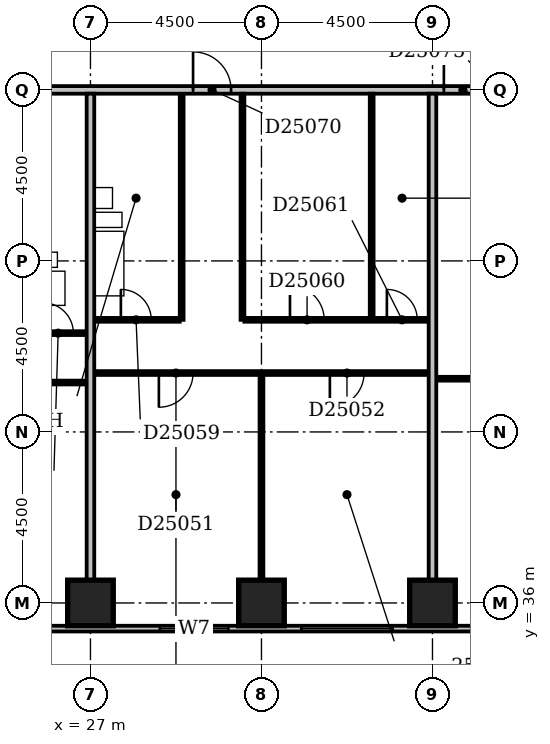
"""IFC4 building model, lengths in metres.
Left out: names, types, materials, properties, quantities, classifications, styles, units other than length and angle.
Written with IfcOpenShell. Run it as: python <this file> out.ifc"""

import sys

from ifc_helpers import new_model, si_unit, direction, frame, frame_2d, origin, origin_2d, place, context, subcontext, project, spatial, rectangle, extrude, element, fill, save


model = new_model("IFC4")
c1 = context("Model", 3, precision=1e-05, world=origin(), true_north=direction((0.0, 1.0)))
c2 = subcontext(c1, "Body", "Model", "MODEL_VIEW")
j1 = project(units=[si_unit("LENGTHUNIT", "METRE"), si_unit("PLANEANGLEUNIT", "RADIAN")], contexts=[c1])
p1 = place(None, origin())
s1 = spatial("IfcSite", under=j1, at=p1, CompositionType="ELEMENT")
p2 = place(p1, origin())
s2 = spatial("IfcBuilding", under=s1, at=p2, CompositionType="ELEMENT")
p3 = place(p2, frame((0.0, 0.0, 101.0)))
s3 = spatial("IfcBuildingStorey", under=s2, at=p3, CompositionType="ELEMENT", Elevation=101.0)
for number, where, z_axis, x_axis in (
    (1, (27.0, 36.0, -0.3), (0.0, 0.0, 1.0), (1.0, 0.0, 0.0)),
    (2, (31.5, 36.0, -0.3), (0.0, 0.0, 1.0), (1.0, 0.0, 0.0)),
    (3, (36.0, 36.0, -0.3), (0.0, 0.0, 1.0), (1.0, 0.0, 0.0)),
):
    element("IfcColumn", number, at=place(p3, frame(where, z_axis=z_axis, x_axis=x_axis)), inside=s3, PredefinedType="COLUMN", context=c2, shape_type="SweptSolid", body=[
        extrude(rectangle(XDim=1.2, YDim=1.2, at=origin_2d()), origin(), (0.0, 0.0, 1.0), 3.6),
    ])
p4 = place(p3, frame((23.1, 35.325, 0.0), z_axis=(0.0, 0.0, 1.0), x_axis=(1.0, 0.0, 0.0)))
e4 = element("IfcWall", 4, at=p4, inside=s3, PredefinedType="STANDARD", context=c2, shape_type="SweptSolid", body=[
    extrude(rectangle(XDim=45.15, YDim=0.15, at=frame_2d((22.575, 0.0))), origin(), (0.0, 0.0, 1.0), 2.7),
])
p5 = place(p4, frame((0.45, 0.0, 0.6)))
e5 = element("IfcOpeningElement", 5, at=p5, cuts=e4, PredefinedType="OPENING", context=c2, shape_type="SweptSolid", body=[
    extrude(rectangle(XDim=2.4, YDim=1.8, at=frame_2d((1.2, 0.9))), frame((0.0, 0.087, 0.0), z_axis=(0.0, -1.0, 0.0), x_axis=(1.0, 0.0, 0.0)), (0.0, 0.0, 1.0), 0.174),
])
p6 = place(p4, frame((5.728, 0.0, 0.6)))
e6 = element("IfcOpeningElement", 6, at=p6, cuts=e4, PredefinedType="OPENING", context=c2, shape_type="SweptSolid", body=[
    extrude(rectangle(XDim=1.8, YDim=1.8, at=frame_2d((0.9, 0.9))), frame((0.0, 0.087, 0.0), z_axis=(0.0, -1.0, 0.0), x_axis=(1.0, 0.0, 0.0)), (0.0, 0.0, 1.0), 0.174),
])
p7 = place(p4, frame((9.45, 0.0, 0.6)))
e7 = element("IfcOpeningElement", 7, at=p7, cuts=e4, PredefinedType="OPENING", context=c2, shape_type="SweptSolid", body=[
    extrude(rectangle(XDim=2.4, YDim=1.8, at=frame_2d((1.2, 0.9))), frame((0.0, 0.087, 0.0), z_axis=(0.0, -1.0, 0.0), x_axis=(1.0, 0.0, 0.0)), (0.0, 0.0, 1.0), 0.174),
])
p8 = place(p4, frame((13.95, 0.0, 0.6)))
e8 = element("IfcOpeningElement", 8, at=p8, cuts=e4, PredefinedType="OPENING", context=c2, shape_type="SweptSolid", body=[
    extrude(rectangle(XDim=2.4, YDim=1.8, at=frame_2d((1.2, 0.9))), frame((0.0, 0.087, 0.0), z_axis=(0.0, -1.0, 0.0), x_axis=(1.0, 0.0, 0.0)), (0.0, 0.0, 1.0), 0.174),
])
p9 = place(p4, frame((18.276, 0.0, 0.6)))
e9 = element("IfcOpeningElement", 9, at=p9, cuts=e4, PredefinedType="OPENING", context=c2, shape_type="SweptSolid", body=[
    extrude(rectangle(XDim=2.4, YDim=1.8, at=frame_2d((1.2, 0.9))), frame((0.0, 0.087, 0.0), z_axis=(0.0, -1.0, 0.0), x_axis=(1.0, 0.0, 0.0)), (0.0, 0.0, 1.0), 0.174),
])
p10 = place(p4, frame((22.95, 0.0, 0.6)))
e10 = element("IfcOpeningElement", 10, at=p10, cuts=e4, PredefinedType="OPENING", context=c2, shape_type="SweptSolid", body=[
    extrude(rectangle(XDim=2.4, YDim=1.8, at=frame_2d((1.2, 0.9))), frame((0.0, 0.087, 0.0), z_axis=(0.0, -1.0, 0.0), x_axis=(1.0, 0.0, 0.0)), (0.0, 0.0, 1.0), 0.174),
])
p11 = place(p4, frame((27.45, 0.0, 0.6)))
e11 = element("IfcOpeningElement", 11, at=p11, cuts=e4, PredefinedType="OPENING", context=c2, shape_type="SweptSolid", body=[
    extrude(rectangle(XDim=2.4, YDim=1.8, at=frame_2d((1.2, 0.9))), frame((0.0, 0.087, 0.0), z_axis=(0.0, -1.0, 0.0), x_axis=(1.0, 0.0, 0.0)), (0.0, 0.0, 1.0), 0.174),
])
p12 = place(p4, frame((33.921, 0.0, 0.6)))
e12 = element("IfcOpeningElement", 12, at=p12, cuts=e4, PredefinedType="OPENING", context=c2, shape_type="SweptSolid", body=[
    extrude(rectangle(XDim=0.6, YDim=1.8, at=frame_2d((0.3, 0.9))), frame((0.0, 0.087, 0.0), z_axis=(0.0, -1.0, 0.0), x_axis=(1.0, 0.0, 0.0)), (0.0, 0.0, 1.0), 0.174),
])
p13 = place(p4, frame((36.45, 0.0, 0.6)))
e13 = element("IfcOpeningElement", 13, at=p13, cuts=e4, PredefinedType="OPENING", context=c2, shape_type="SweptSolid", body=[
    extrude(rectangle(XDim=2.4, YDim=1.8, at=frame_2d((1.2, 0.9))), frame((0.0, 0.087, 0.0), z_axis=(0.0, -1.0, 0.0), x_axis=(1.0, 0.0, 0.0)), (0.0, 0.0, 1.0), 0.174),
])
p14 = place(p4, frame((40.95, 0.0, 0.6)))
e14 = element("IfcOpeningElement", 14, at=p14, cuts=e4, PredefinedType="OPENING", context=c2, shape_type="SweptSolid", body=[
    extrude(rectangle(XDim=2.4, YDim=1.8, at=frame_2d((1.2, 0.9))), frame((0.0, 0.087, 0.0), z_axis=(0.0, -1.0, 0.0), x_axis=(1.0, 0.0, 0.0)), (0.0, 0.0, 1.0), 0.174),
])
p15 = place(p3, frame((27.0, 36.6, 0.0), z_axis=(0.0, 0.0, 1.0), x_axis=(0.0, 1.0, 0.0)))
e15 = element("IfcWall", 15, at=p15, inside=s3, PredefinedType="PARTITIONING", context=c2, shape_type="SweptSolid", body=[
    extrude(rectangle(XDim=12.8, YDim=0.2, at=frame_2d((6.4, 0.0))), origin(), (0.0, 0.0, 1.0), 2.6),
])
p16 = place(p3, frame((31.5, 36.6, 0.0), z_axis=(0.0, 0.0, 1.0), x_axis=(0.0, 1.0, 0.0)))
e16 = element("IfcWall", 16, at=p16, inside=s3, PredefinedType="PARTITIONING", context=c2, shape_type="SweptSolid", body=[
    extrude(rectangle(XDim=5.4, YDim=0.1, at=frame_2d((2.7, 0.0))), origin(), (0.0, 0.0, 1.0), 3.3),
])
p17 = place(p3, frame((36.0, 36.6, 0.0), z_axis=(0.0, 0.0, 1.0), x_axis=(0.0, 1.0, 0.0)))
e17 = element("IfcWall", 17, at=p17, inside=s3, PredefinedType="PARTITIONING", context=c2, shape_type="SweptSolid", body=[
    extrude(rectangle(XDim=12.8, YDim=0.2, at=frame_2d((6.4, 0.0))), origin(), (0.0, 0.0, 1.0), 2.4),
])
p18 = place(p3, frame((22.6, 41.8, 0.0), z_axis=(0.0, 0.0, 1.0), x_axis=(1.0, 0.0, 0.0)))
e18 = element("IfcWall", 18, at=p18, inside=s3, PredefinedType="PARTITIONING", context=c2, shape_type="SweptSolid", body=[
    extrude(rectangle(XDim=4.3, YDim=0.1, at=frame_2d((2.15, 0.0))), origin(), (0.0, 0.0, 1.0), 3.3),
])
p19 = place(p18, frame((1.7, 0.0, 0.0)))
e19 = element("IfcOpeningElement", 19, at=p19, cuts=e18, PredefinedType="OPENING", context=c2, shape_type="SweptSolid", body=[
    extrude(rectangle(XDim=0.9, YDim=2.1, at=frame_2d((0.45, 1.05))), frame((0.0, 0.062, 0.0), z_axis=(0.0, -1.0, 0.0), x_axis=(1.0, 0.0, 0.0)), (0.0, 0.0, 1.0), 0.124),
])
p20 = place(p3, frame((36.1, 41.9, 0.0), z_axis=(0.0, 0.0, 1.0), x_axis=(1.0, 0.0, 0.0)))
e20 = element("IfcWall", 20, at=p20, inside=s3, PredefinedType="PARTITIONING", context=c2, shape_type="SweptSolid", body=[
    extrude(rectangle(XDim=13.3, YDim=0.1, at=frame_2d((6.65, 0.0))), origin(), (0.0, 0.0, 1.0), 3.3),
])
p21 = place(p20, frame((1.7, 0.0, 0.0)))
e21 = element("IfcOpeningElement", 21, at=p21, cuts=e20, PredefinedType="OPENING", context=c2, shape_type="SweptSolid", body=[
    extrude(rectangle(XDim=0.9, YDim=2.1, at=frame_2d((0.45, 1.05))), frame((0.0, 0.062, 0.0), z_axis=(0.0, -1.0, 0.0), x_axis=(1.0, 0.0, 0.0)), (0.0, 0.0, 1.0), 0.124),
])
p22 = place(p20, frame((7.35, 0.0, 0.0)))
e22 = element("IfcOpeningElement", 22, at=p22, cuts=e20, PredefinedType="OPENING", context=c2, shape_type="SweptSolid", body=[
    extrude(rectangle(XDim=0.9, YDim=2.1, at=frame_2d((0.45, 1.05))), frame((0.0, 0.062, 0.0), z_axis=(0.0, -1.0, 0.0), x_axis=(1.0, 0.0, 0.0)), (0.0, 0.0, 1.0), 0.124),
])
p23 = place(p20, frame((10.7, 0.0, 0.0)))
e23 = element("IfcOpeningElement", 23, at=p23, cuts=e20, PredefinedType="OPENING", context=c2, shape_type="SweptSolid", body=[
    extrude(rectangle(XDim=0.9, YDim=2.1, at=frame_2d((0.45, 1.05))), frame((0.0, 0.062, 0.0), z_axis=(0.0, -1.0, 0.0), x_axis=(1.0, 0.0, 0.0)), (0.0, 0.0, 1.0), 0.124),
])
p24 = place(p3, frame((27.1, 42.05, 0.0), z_axis=(0.0, 0.0, 1.0), x_axis=(1.0, 0.0, 0.0)))
e24 = element("IfcWall", 24, at=p24, inside=s3, PredefinedType="PARTITIONING", context=c2, shape_type="SweptSolid", body=[
    extrude(rectangle(XDim=8.8, YDim=0.1, at=frame_2d((4.4, 0.0))), origin(), (0.0, 0.0, 1.0), 3.3),
])
p25 = place(p24, frame((1.7, 0.0, 0.0)))
e25 = element("IfcOpeningElement", 25, at=p25, cuts=e24, PredefinedType="OPENING", context=c2, shape_type="SweptSolid", body=[
    extrude(rectangle(XDim=0.9, YDim=2.1, at=frame_2d((0.45, 1.05))), frame((0.0, 0.062, 0.0), z_axis=(0.0, -1.0, 0.0), x_axis=(1.0, 0.0, 0.0)), (0.0, 0.0, 1.0), 0.124),
])
p26 = place(p24, frame((6.2, 0.0, 0.0)))
e26 = element("IfcOpeningElement", 26, at=p26, cuts=e24, PredefinedType="OPENING", context=c2, shape_type="SweptSolid", body=[
    extrude(rectangle(XDim=0.9, YDim=2.1, at=frame_2d((0.45, 1.05))), frame((0.0, 0.062, 0.0), z_axis=(0.0, -1.0, 0.0), x_axis=(1.0, 0.0, 0.0)), (0.0, 0.0, 1.0), 0.124),
])
p27 = place(p3, frame((25.35, 43.1, 0.0), z_axis=(0.0, 0.0, 1.0), x_axis=(1.0, 0.0, 0.0)))
e27 = element("IfcWall", 27, at=p27, inside=s3, PredefinedType="PARTITIONING", context=c2, shape_type="SweptSolid", body=[
    extrude(rectangle(XDim=1.55, YDim=0.1, at=frame_2d((0.775, 0.0))), origin(), (0.0, 0.0, 1.0), 3.3),
])
p28 = place(p27, frame((0.4, 0.0, 0.0)))
e28 = element("IfcOpeningElement", 28, at=p28, cuts=e27, PredefinedType="OPENING", context=c2, shape_type="SweptSolid", body=[
    extrude(rectangle(XDim=0.8, YDim=2.1, at=frame_2d((0.4, 1.05))), frame((0.0, 0.062, 0.0), z_axis=(0.0, -1.0, 0.0), x_axis=(1.0, 0.0, 0.0)), (0.0, 0.0, 1.0), 0.124),
])
p29 = place(p3, frame((27.1, 43.45, 0.0), z_axis=(0.0, 0.0, 1.0), x_axis=(1.0, 0.0, 0.0)))
e29 = element("IfcWall", 29, at=p29, inside=s3, PredefinedType="PARTITIONING", context=c2, shape_type="SweptSolid", body=[
    extrude(rectangle(XDim=2.25, YDim=0.1, at=frame_2d((1.125, 0.0))), origin(), (0.0, 0.0, 1.0), 3.3),
])
p30 = place(p29, frame((0.7, 0.0, 0.0)))
e30 = element("IfcOpeningElement", 30, at=p30, cuts=e29, PredefinedType="OPENING", context=c2, shape_type="SweptSolid", body=[
    extrude(rectangle(XDim=0.8, YDim=2.1, at=frame_2d((0.4, 1.05))), frame((0.0, 0.062, 0.0), z_axis=(0.0, -1.0, 0.0), x_axis=(1.0, 0.0, 0.0)), (0.0, 0.0, 1.0), 0.124),
])
p31 = place(p3, frame((29.4, 43.45, 0.0), z_axis=(0.0, 0.0, 1.0), x_axis=(0.0, 1.0, 0.0)))
e31 = element("IfcWall", 31, at=p31, inside=s3, PredefinedType="PLUMBINGWALL", context=c2, shape_type="SweptSolid", body=[
    extrude(rectangle(XDim=5.95, YDim=0.1, at=frame_2d((2.975, 0.0))), origin(), (0.0, 0.0, 1.0), 3.3),
])
p32 = place(p3, frame((31.0, 43.45, 0.0), z_axis=(0.0, 0.0, 1.0), x_axis=(0.0, 1.0, 0.0)))
e32 = element("IfcWall", 32, at=p32, inside=s3, PredefinedType="PARTITIONING", context=c2, shape_type="SweptSolid", body=[
    extrude(rectangle(XDim=5.95, YDim=0.1, at=frame_2d((2.975, 0.0))), origin(), (0.0, 0.0, 1.0), 3.3),
])
p33 = place(p3, frame((31.05, 43.45, 0.0), z_axis=(0.0, 0.0, 1.0), x_axis=(1.0, 0.0, 0.0)))
e33 = element("IfcWall", 33, at=p33, inside=s3, PredefinedType="PARTITIONING", context=c2, shape_type="SweptSolid", body=[
    extrude(rectangle(XDim=4.85, YDim=0.1, at=frame_2d((2.425, 0.0))), origin(), (0.0, 0.0, 1.0), 3.3),
])
p34 = place(p33, frame((1.2, 0.0, 0.0)))
e34 = element("IfcOpeningElement", 34, at=p34, cuts=e33, PredefinedType="OPENING", context=c2, shape_type="SweptSolid", body=[
    extrude(rectangle(XDim=0.9, YDim=2.1, at=frame_2d((0.45, 1.05))), frame((0.0, 0.062, 0.0), z_axis=(0.0, -1.0, 0.0), x_axis=(1.0, 0.0, 0.0)), (0.0, 0.0, 1.0), 0.124),
])
p35 = place(p33, frame((3.75, 0.0, 0.0)))
e35 = element("IfcOpeningElement", 35, at=p35, cuts=e33, PredefinedType="OPENING", context=c2, shape_type="SweptSolid", body=[
    extrude(rectangle(XDim=0.8, YDim=2.1, at=frame_2d((0.4, 1.05))), frame((0.0, 0.062, 0.0), z_axis=(0.0, -1.0, 0.0), x_axis=(1.0, 0.0, 0.0)), (0.0, 0.0, 1.0), 0.124),
])
p36 = place(p3, frame((34.4, 43.5, 0.0), z_axis=(0.0, 0.0, 1.0), x_axis=(0.0, 1.0, 0.0)))
e36 = element("IfcWall", 36, at=p36, inside=s3, PredefinedType="PARTITIONING", context=c2, shape_type="SweptSolid", body=[
    extrude(rectangle(XDim=5.9, YDim=0.1, at=frame_2d((2.95, 0.0))), origin(), (0.0, 0.0, 1.0), 3.3),
])
p37 = place(p3, frame((9.1, 49.5, 0.0), z_axis=(0.0, 0.0, 1.0), x_axis=(1.0, 0.0, 0.0)))
e37 = element("IfcWall", 37, at=p37, inside=s3, PredefinedType="PARTITIONING", context=c2, shape_type="SweptSolid", body=[
    extrude(rectangle(XDim=57.8, YDim=0.2, at=frame_2d((28.9, 0.0))), origin(), (0.0, 0.0, 1.0), 3.3),
])
p38 = place(p37, frame((14.95, 0.0, 0.0)))
e38 = element("IfcOpeningElement", 38, at=p38, cuts=e37, PredefinedType="OPENING", context=c2, shape_type="SweptSolid", body=[
    extrude(rectangle(XDim=1.0, YDim=2.1, at=frame_2d((0.5, 1.05))), frame((0.0, 0.112, 0.0), z_axis=(0.0, -1.0, 0.0), x_axis=(1.0, 0.0, 0.0)), (0.0, 0.0, 1.0), 0.224),
])
p39 = place(p37, frame((20.6, 0.0, 0.0)))
e39 = element("IfcOpeningElement", 39, at=p39, cuts=e37, PredefinedType="OPENING", context=c2, shape_type="SweptSolid", body=[
    extrude(rectangle(XDim=1.0, YDim=2.1, at=frame_2d((0.5, 1.05))), frame((0.0, 0.112, 0.0), z_axis=(0.0, -1.0, 0.0), x_axis=(1.0, 0.0, 0.0)), (0.0, 0.0, 1.0), 0.224),
])
p40 = place(p37, frame((27.2, 0.0, 0.0)))
e40 = element("IfcOpeningElement", 40, at=p40, cuts=e37, PredefinedType="OPENING", context=c2, shape_type="SweptSolid", body=[
    extrude(rectangle(XDim=1.0, YDim=2.1, at=frame_2d((0.5, 1.05))), frame((0.0, 0.112, 0.0), z_axis=(0.0, -1.0, 0.0), x_axis=(1.0, 0.0, 0.0)), (0.0, 0.0, 1.0), 0.224),
])
p41 = place(p37, frame((40.7, 0.0, 0.0)))
e41 = element("IfcOpeningElement", 41, at=p41, cuts=e37, PredefinedType="OPENING", context=c2, shape_type="SweptSolid", body=[
    extrude(rectangle(XDim=1.0, YDim=2.1, at=frame_2d((0.5, 1.05))), frame((0.0, 0.112, 0.0), z_axis=(0.0, -1.0, 0.0), x_axis=(1.0, 0.0, 0.0)), (0.0, 0.0, 1.0), 0.224),
])
p42 = place(p37, frame((10.65, 0.0, 0.0)))
e42 = element("IfcOpeningElement", 42, at=p42, cuts=e37, PredefinedType="OPENING", context=c2, shape_type="SweptSolid", body=[
    extrude(rectangle(XDim=0.9, YDim=2.1, at=frame_2d((0.45, 1.05))), frame((0.0, 0.112, 0.0), z_axis=(0.0, -1.0, 0.0), x_axis=(1.0, 0.0, 0.0)), (0.0, 0.0, 1.0), 0.224),
])
p43 = place(p6, origin())
e43 = element("IfcWindow", 43, at=p43, inside=s3, PartitioningType="SINGLE_PANEL", PredefinedType="WINDOW", context=c2, shape_type="SweptSolid", body=[
    extrude(rectangle(XDim=1.8, YDim=1.8, at=frame_2d((0.9, 0.9))), frame((0.0, 0.03, 0.0), z_axis=(0.0, -1.0, 0.0), x_axis=(1.0, 0.0, 0.0)), (0.0, 0.0, 1.0), 0.06),
])
fill(e6, e43)
p44 = place(p7, origin())
e44 = element("IfcWindow", 44, at=p44, inside=s3, PartitioningType="SINGLE_PANEL", PredefinedType="WINDOW", context=c2, shape_type="SweptSolid", body=[
    extrude(rectangle(XDim=2.4, YDim=1.8, at=frame_2d((1.2, 0.9))), frame((0.0, 0.03, 0.0), z_axis=(0.0, -1.0, 0.0), x_axis=(1.0, 0.0, 0.0)), (0.0, 0.0, 1.0), 0.06),
])
fill(e7, e44)
p45 = place(p25, frame((0.9, 0.0, 0.0), z_axis=(0.0, 0.0, 1.0), x_axis=(-1.0, 0.0, 0.0)))
e45 = element("IfcDoor", 45, at=p45, inside=s3, OperationType="SINGLE_SWING_RIGHT", PredefinedType="DOOR", context=c2, shape_type="SweptSolid", body=[
    extrude(rectangle(XDim=0.9, YDim=2.1, at=frame_2d((0.45, 1.05))), frame((0.0, 0.025, 0.0), z_axis=(0.0, -1.0, 0.0), x_axis=(1.0, 0.0, 0.0)), (0.0, 0.0, 1.0), 0.05),
])
fill(e25, e45)
p46 = place(p26, frame((0.9, 0.0, 0.0), z_axis=(0.0, 0.0, 1.0), x_axis=(-1.0, 0.0, 0.0)))
e46 = element("IfcDoor", 46, at=p46, inside=s3, OperationType="SINGLE_SWING_RIGHT", PredefinedType="DOOR", context=c2, shape_type="SweptSolid", body=[
    extrude(rectangle(XDim=0.9, YDim=2.1, at=frame_2d((0.45, 1.05))), frame((0.0, 0.025, 0.0), z_axis=(0.0, -1.0, 0.0), x_axis=(1.0, 0.0, 0.0)), (0.0, 0.0, 1.0), 0.05),
])
fill(e26, e46)
p47 = place(p28, origin())
e47 = element("IfcDoor", 47, at=p47, inside=s3, OperationType="SINGLE_SWING_LEFT", PredefinedType="DOOR", context=c2, shape_type="SweptSolid", body=[
    extrude(rectangle(XDim=0.8, YDim=2.1, at=frame_2d((0.4, 1.05))), frame((0.0, 0.025, 0.0), z_axis=(0.0, -1.0, 0.0), x_axis=(1.0, 0.0, 0.0)), (0.0, 0.0, 1.0), 0.05),
])
fill(e28, e47)
p48 = place(p30, origin())
e48 = element("IfcDoor", 48, at=p48, inside=s3, OperationType="SINGLE_SWING_LEFT", PredefinedType="DOOR", context=c2, shape_type="SweptSolid", body=[
    extrude(rectangle(XDim=0.8, YDim=2.1, at=frame_2d((0.4, 1.05))), frame((0.0, 0.025, 0.0), z_axis=(0.0, -1.0, 0.0), x_axis=(1.0, 0.0, 0.0)), (0.0, 0.0, 1.0), 0.05),
])
fill(e30, e48)
p49 = place(p34, origin())
e49 = element("IfcDoor", 49, at=p49, inside=s3, OperationType="SINGLE_SWING_LEFT", PredefinedType="DOOR", context=c2, shape_type="SweptSolid", body=[
    extrude(rectangle(XDim=0.9, YDim=2.1, at=frame_2d((0.45, 1.05))), frame((0.0, 0.025, 0.0), z_axis=(0.0, -1.0, 0.0), x_axis=(1.0, 0.0, 0.0)), (0.0, 0.0, 1.0), 0.05),
])
fill(e34, e49)
p50 = place(p35, origin())
e50 = element("IfcDoor", 50, at=p50, inside=s3, OperationType="SINGLE_SWING_LEFT", PredefinedType="DOOR", context=c2, shape_type="SweptSolid", body=[
    extrude(rectangle(XDim=0.8, YDim=2.1, at=frame_2d((0.4, 1.05))), frame((0.0, 0.025, 0.0), z_axis=(0.0, -1.0, 0.0), x_axis=(1.0, 0.0, 0.0)), (0.0, 0.0, 1.0), 0.05),
])
fill(e35, e50)
p51 = place(p39, origin())
e51 = element("IfcDoor", 51, at=p51, inside=s3, OperationType="SINGLE_SWING_LEFT", PredefinedType="DOOR", context=c2, shape_type="SweptSolid", body=[
    extrude(rectangle(XDim=1.0, YDim=2.1, at=frame_2d((0.5, 1.05))), frame((0.0, 0.025, 0.0), z_axis=(0.0, -1.0, 0.0), x_axis=(1.0, 0.0, 0.0)), (0.0, 0.0, 1.0), 0.05),
])
fill(e39, e51)
p52 = place(p40, origin())
e52 = element("IfcDoor", 52, at=p52, inside=s3, OperationType="SINGLE_SWING_LEFT", PredefinedType="DOOR", context=c2, shape_type="SweptSolid", body=[
    extrude(rectangle(XDim=1.0, YDim=2.1, at=frame_2d((0.5, 1.05))), frame((0.0, 0.025, 0.0), z_axis=(0.0, -1.0, 0.0), x_axis=(1.0, 0.0, 0.0)), (0.0, 0.0, 1.0), 0.05),
])
fill(e40, e52)
save(model, sys.argv[1])
